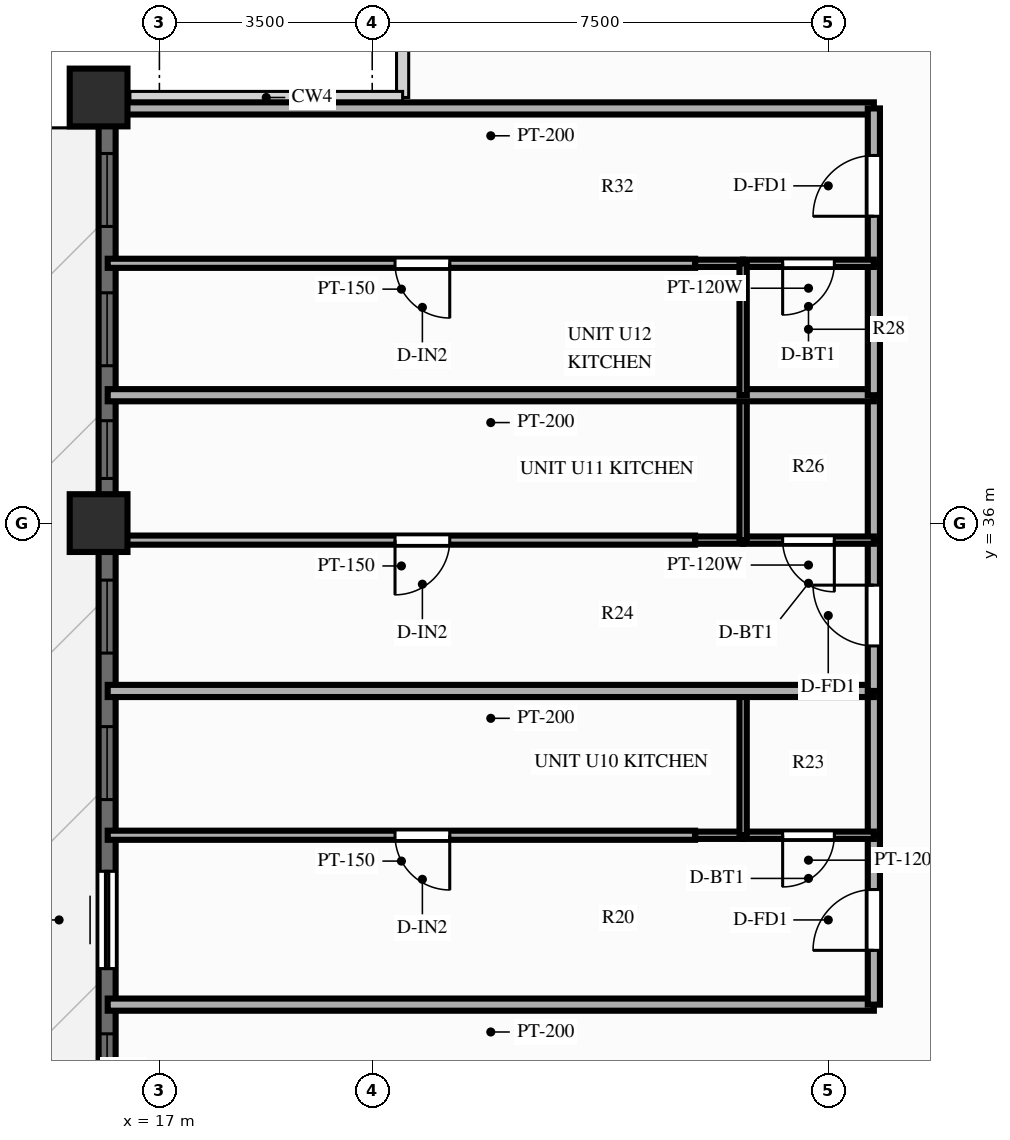
"""IFC4 building model, lengths in metres.
Left out: names, types, materials, properties, quantities, classifications, styles, units other than length and angle.
Written with IfcOpenShell. Run it as: python <this file> out.ifc"""

import sys

from ifc_helpers import new_model, si_unit, direction, frame, frame_2d, origin, origin_2d, place, context, subcontext, project, spatial, rectangle, extrude, source, transform, mapped, element, fill, save


model = new_model("IFC4")
c1 = context("Model", 3, precision=1e-05, world=origin(), true_north=direction((0.0, 1.0)))
c2 = subcontext(c1, "Body", "Model", "MODEL_VIEW")
j1 = project(units=[si_unit("LENGTHUNIT", "METRE"), si_unit("PLANEANGLEUNIT", "RADIAN")], contexts=[c1])
p1 = place(None, origin())
s1 = spatial("IfcSite", under=j1, at=p1, CompositionType="ELEMENT")
p2 = place(p1, origin())
s2 = spatial("IfcBuilding", under=s1, at=p2, CompositionType="ELEMENT")
p3 = place(p2, frame((0.0, 0.0, 166.0)))
s3 = spatial("IfcBuildingStorey", under=s2, at=p3, CompositionType="ELEMENT", Elevation=166.0)
m1 = source(origin(), c2, "Body", "SweptSolid", [
    extrude(rectangle(XDim=0.95, YDim=0.95, at=origin_2d()), origin(), (0.0, 0.0, 1.0), 3.0),
])
for number, where, z_axis, x_axis in (
    (1, (16.0, 43.0, 0.0), (0.0, 0.0, 1.0), (1.0, 0.0, 0.0)),
    (2, (16.0, 36.0, 0.0), (0.0, 0.0, 1.0), (1.0, 0.0, 0.0)),
):
    element("IfcColumn", number, at=place(p3, frame(where, z_axis=z_axis, x_axis=x_axis)), inside=s3, PredefinedType="COLUMN", context=c2, shape_type="MappedRepresentation", body=[
        mapped(m1, transform((0.0, 0.0, 0.0), scale=1.0)),
    ])
p4 = place(p3, frame((16.14, 11.0, 0.0), z_axis=(0.0, 0.0, 1.0), x_axis=(0.0, 1.0, 0.0)))
e3 = element("IfcWall", 3, at=p4, inside=s3, PredefinedType="SOLIDWALL", context=c2, shape_type="SweptSolid", body=[
    extrude(rectangle(XDim=32.0, YDim=0.28, at=frame_2d((16.0, 0.0))), origin(), (0.0, 0.0, 1.0), 2.28),
])
p5 = place(p4, frame((1.001, 0.0, 0.25)))
e4 = element("IfcOpeningElement", 4, at=p5, cuts=e3, PredefinedType="OPENING", context=c2, shape_type="SweptSolid", body=[
    extrude(rectangle(XDim=1.2, YDim=1.5, at=frame_2d((0.6, 0.75))), frame((0.0, 0.152, 0.0), z_axis=(0.0, -1.0, 0.0), x_axis=(1.0, 0.0, 0.0)), (0.0, 0.0, 1.0), 0.304),
])
p6 = place(p4, frame((3.439, 0.0, 0.25)))
e5 = element("IfcOpeningElement", 5, at=p6, cuts=e3, PredefinedType="OPENING", context=c2, shape_type="SweptSolid", body=[
    extrude(rectangle(XDim=1.2, YDim=1.5, at=frame_2d((0.6, 0.75))), frame((0.0, 0.152, 0.0), z_axis=(0.0, -1.0, 0.0), x_axis=(1.0, 0.0, 0.0)), (0.0, 0.0, 1.0), 0.304),
])
p7 = place(p4, frame((5.588, 0.0, 0.25)))
e6 = element("IfcOpeningElement", 6, at=p7, cuts=e3, PredefinedType="OPENING", context=c2, shape_type="SweptSolid", body=[
    extrude(rectangle(XDim=0.7, YDim=1.5, at=frame_2d((0.35, 0.75))), frame((0.0, 0.152, 0.0), z_axis=(0.0, -1.0, 0.0), x_axis=(1.0, 0.0, 0.0)), (0.0, 0.0, 1.0), 0.304),
])
p8 = place(p4, frame((8.085, 0.0, 0.25)))
e7 = element("IfcOpeningElement", 7, at=p8, cuts=e3, PredefinedType="OPENING", context=c2, shape_type="SweptSolid", body=[
    extrude(rectangle(XDim=1.2, YDim=1.5, at=frame_2d((0.6, 0.75))), frame((0.0, 0.152, 0.0), z_axis=(0.0, -1.0, 0.0), x_axis=(1.0, 0.0, 0.0)), (0.0, 0.0, 1.0), 0.304),
])
p9 = place(p4, frame((10.575, 0.0, 0.25)))
e8 = element("IfcOpeningElement", 8, at=p9, cuts=e3, PredefinedType="OPENING", context=c2, shape_type="SweptSolid", body=[
    extrude(rectangle(XDim=1.2, YDim=1.5, at=frame_2d((0.6, 0.75))), frame((0.0, 0.152, 0.0), z_axis=(0.0, -1.0, 0.0), x_axis=(1.0, 0.0, 0.0)), (0.0, 0.0, 1.0), 0.304),
])
p10 = place(p4, frame((13.007, 0.0, 0.25)))
e9 = element("IfcOpeningElement", 9, at=p10, cuts=e3, PredefinedType="OPENING", context=c2, shape_type="SweptSolid", body=[
    extrude(rectangle(XDim=1.2, YDim=1.5, at=frame_2d((0.6, 0.75))), frame((0.0, 0.152, 0.0), z_axis=(0.0, -1.0, 0.0), x_axis=(1.0, 0.0, 0.0)), (0.0, 0.0, 1.0), 0.304),
])
p11 = place(p4, frame((15.4, 0.0, 0.25)))
e10 = element("IfcOpeningElement", 10, at=p11, cuts=e3, PredefinedType="OPENING", context=c2, shape_type="SweptSolid", body=[
    extrude(rectangle(XDim=1.2, YDim=1.5, at=frame_2d((0.6, 0.75))), frame((0.0, 0.152, 0.0), z_axis=(0.0, -1.0, 0.0), x_axis=(1.0, 0.0, 0.0)), (0.0, 0.0, 1.0), 0.304),
])
p12 = place(p4, frame((17.673, 0.0, 0.0)))
e11 = element("IfcOpeningElement", 11, at=p12, cuts=e3, PredefinedType="OPENING", context=c2, shape_type="SweptSolid", body=[
    extrude(rectangle(XDim=1.6, YDim=2.15, at=frame_2d((0.8, 1.075))), frame((0.0, 0.152, 0.0), z_axis=(0.0, -1.0, 0.0), x_axis=(1.0, 0.0, 0.0)), (0.0, 0.0, 1.0), 0.304),
])
p13 = place(p4, frame((20.452, 0.0, 0.25)))
e12 = element("IfcOpeningElement", 12, at=p13, cuts=e3, PredefinedType="OPENING", context=c2, shape_type="SweptSolid", body=[
    extrude(rectangle(XDim=1.2, YDim=1.5, at=frame_2d((0.6, 0.75))), frame((0.0, 0.152, 0.0), z_axis=(0.0, -1.0, 0.0), x_axis=(1.0, 0.0, 0.0)), (0.0, 0.0, 1.0), 0.304),
])
p14 = place(p4, frame((22.862, 0.0, 0.25)))
e13 = element("IfcOpeningElement", 13, at=p14, cuts=e3, PredefinedType="OPENING", context=c2, shape_type="SweptSolid", body=[
    extrude(rectangle(XDim=1.2, YDim=1.5, at=frame_2d((0.6, 0.75))), frame((0.0, 0.152, 0.0), z_axis=(0.0, -1.0, 0.0), x_axis=(1.0, 0.0, 0.0)), (0.0, 0.0, 1.0), 0.304),
])
p15 = place(p4, frame((25.734, 0.0, 0.25)))
e14 = element("IfcOpeningElement", 14, at=p15, cuts=e3, PredefinedType="OPENING", context=c2, shape_type="SweptSolid", body=[
    extrude(rectangle(XDim=0.95, YDim=1.5, at=frame_2d((0.475, 0.75))), frame((0.0, 0.152, 0.0), z_axis=(0.0, -1.0, 0.0), x_axis=(1.0, 0.0, 0.0)), (0.0, 0.0, 1.0), 0.304),
])
p16 = place(p4, frame((27.588, 0.0, 0.25)))
e15 = element("IfcOpeningElement", 15, at=p16, cuts=e3, PredefinedType="OPENING", context=c2, shape_type="SweptSolid", body=[
    extrude(rectangle(XDim=1.2, YDim=1.5, at=frame_2d((0.6, 0.75))), frame((0.0, 0.152, 0.0), z_axis=(0.0, -1.0, 0.0), x_axis=(1.0, 0.0, 0.0)), (0.0, 0.0, 1.0), 0.304),
])
p17 = place(p4, frame((29.879, 0.0, 0.25)))
e16 = element("IfcOpeningElement", 16, at=p17, cuts=e3, PredefinedType="OPENING", context=c2, shape_type="SweptSolid", body=[
    extrude(rectangle(XDim=1.2, YDim=1.5, at=frame_2d((0.6, 0.75))), frame((0.0, 0.152, 0.0), z_axis=(0.0, -1.0, 0.0), x_axis=(1.0, 0.0, 0.0)), (0.0, 0.0, 1.0), 0.304),
])
for number, where, z_axis, x_axis in (
    (17, (28.75, 28.08, 0.0), (0.0, 0.0, 1.0), (-1.0, 0.0, 0.0)),
    (18, (28.75, 42.82, 0.0), (0.0, 0.0, 1.0), (-1.0, 0.0, 0.0)),
):
    element("IfcWall", number, at=place(p3, frame(where, z_axis=z_axis, x_axis=x_axis)), inside=s3, PredefinedType="PARTITIONING", context=c2, shape_type="SweptSolid", body=[
        extrude(rectangle(XDim=12.6, YDim=0.2, at=frame_2d((6.3, 0.0))), origin(), (0.0, 0.0, 1.0), 2.79),
    ])
p18 = place(p3, frame((28.75, 28.08, 0.0), z_axis=(0.0, 0.0, 1.0), x_axis=(0.0, 1.0, 0.0)))
e19 = element("IfcWall", 19, at=p18, inside=s3, PredefinedType="PARTITIONING", context=c2, shape_type="SweptSolid", body=[
    extrude(rectangle(XDim=2.786, YDim=0.2, at=frame_2d((1.393, 0.0))), origin(), (0.0, 0.0, 1.0), 2.79),
])
p19 = place(p18, frame((0.893, 0.0, 0.0)))
e20 = element("IfcOpeningElement", 20, at=p19, cuts=e19, PredefinedType="OPENING", context=c2, shape_type="SweptSolid", body=[
    extrude(rectangle(XDim=1.0, YDim=2.15, at=frame_2d((0.5, 1.075))), frame((0.0, 0.112, 0.0), z_axis=(0.0, -1.0, 0.0), x_axis=(1.0, 0.0, 0.0)), (0.0, 0.0, 1.0), 0.224),
])
p20 = place(p3, frame((28.75, 30.866, 0.0), z_axis=(0.0, 0.0, 1.0), x_axis=(0.0, 1.0, 0.0)))
e21 = element("IfcWall", 21, at=p20, inside=s3, PredefinedType="PARTITIONING", context=c2, shape_type="SweptSolid", body=[
    extrude(rectangle(XDim=2.373, YDim=0.2, at=frame_2d((1.187, 0.0))), origin(), (0.0, 0.0, 1.0), 2.79),
])
p21 = place(p3, frame((28.75, 30.866, 0.0), z_axis=(0.0, 0.0, 1.0), x_axis=(-1.0, 0.0, 0.0)))
e22 = element("IfcWall", 22, at=p21, inside=s3, PredefinedType="PARTITIONING", context=c2, shape_type="SweptSolid", body=[
    extrude(rectangle(XDim=2.15, YDim=0.12, at=frame_2d((1.075, 0.0))), origin(), (0.0, 0.0, 1.0), 2.79),
])
p22 = place(p21, frame((0.65, 0.0, 0.0)))
e23 = element("IfcOpeningElement", 23, at=p22, cuts=e22, PredefinedType="OPENING", context=c2, shape_type="SweptSolid", body=[
    extrude(rectangle(XDim=0.85, YDim=2.05, at=frame_2d((0.425, 1.025))), frame((0.0, 0.072, 0.0), z_axis=(0.0, -1.0, 0.0), x_axis=(1.0, 0.0, 0.0)), (0.0, 0.0, 1.0), 0.144),
])
p23 = place(p3, frame((26.6, 30.866, 0.0), z_axis=(0.0, 0.0, 1.0), x_axis=(-1.0, 0.0, 0.0)))
e24 = element("IfcWall", 24, at=p23, inside=s3, PredefinedType="PARTITIONING", context=c2, shape_type="SweptSolid", body=[
    extrude(rectangle(XDim=0.79, YDim=0.12, at=frame_2d((0.395, 0.0))), origin(), (0.0, 0.0, 1.0), 2.79),
])
p24 = place(p3, frame((26.6, 30.866, 0.0), z_axis=(0.0, 0.0, 1.0), x_axis=(0.0, 1.0, 0.0)))
e25 = element("IfcWall", 25, at=p24, inside=s3, PredefinedType="PARTITIONING", context=c2, shape_type="SweptSolid", body=[
    extrude(rectangle(XDim=2.373, YDim=0.12, at=frame_2d((1.187, 0.0))), origin(), (0.0, 0.0, 1.0), 2.79),
])
p25 = place(p3, frame((25.81, 30.866, 0.0), z_axis=(0.0, 0.0, 1.0), x_axis=(-1.0, 0.0, 0.0)))
e26 = element("IfcWall", 26, at=p25, inside=s3, PredefinedType="PARTITIONING", context=c2, shape_type="SweptSolid", body=[
    extrude(rectangle(XDim=9.66, YDim=0.15, at=frame_2d((4.83, 0.0))), origin(), (0.0, 0.0, 1.0), 2.79),
])
p26 = place(p25, frame((4.035, 0.0, 0.0)))
e27 = element("IfcOpeningElement", 27, at=p26, cuts=e26, PredefinedType="OPENING", context=c2, shape_type="SweptSolid", body=[
    extrude(rectangle(XDim=0.9, YDim=2.1, at=frame_2d((0.45, 1.05))), frame((0.0, 0.087, 0.0), z_axis=(0.0, -1.0, 0.0), x_axis=(1.0, 0.0, 0.0)), (0.0, 0.0, 1.0), 0.174),
])
p27 = place(p3, frame((28.75, 33.239, 0.0), z_axis=(0.0, 0.0, 1.0), x_axis=(-1.0, 0.0, 0.0)))
e28 = element("IfcWall", 28, at=p27, inside=s3, PredefinedType="PARTITIONING", context=c2, shape_type="SweptSolid", body=[
    extrude(rectangle(XDim=12.6, YDim=0.2, at=frame_2d((6.3, 0.0))), origin(), (0.0, 0.0, 1.0), 2.79),
])
p28 = place(p3, frame((28.75, 33.239, 0.0), z_axis=(0.0, 0.0, 1.0), x_axis=(0.0, 1.0, 0.0)))
e29 = element("IfcWall", 29, at=p28, inside=s3, PredefinedType="PARTITIONING", context=c2, shape_type="SweptSolid", body=[
    extrude(rectangle(XDim=2.481, YDim=0.2, at=frame_2d((1.24, 0.0))), origin(), (0.0, 0.0, 1.0), 2.79),
])
p29 = place(p28, frame((0.74, 0.0, 0.0)))
e30 = element("IfcOpeningElement", 30, at=p29, cuts=e29, PredefinedType="OPENING", context=c2, shape_type="SweptSolid", body=[
    extrude(rectangle(XDim=1.0, YDim=2.15, at=frame_2d((0.5, 1.075))), frame((0.0, 0.112, 0.0), z_axis=(0.0, -1.0, 0.0), x_axis=(1.0, 0.0, 0.0)), (0.0, 0.0, 1.0), 0.224),
])
p30 = place(p3, frame((28.75, 35.72, 0.0), z_axis=(0.0, 0.0, 1.0), x_axis=(0.0, 1.0, 0.0)))
e31 = element("IfcWall", 31, at=p30, inside=s3, PredefinedType="PARTITIONING", context=c2, shape_type="SweptSolid", body=[
    extrude(rectangle(XDim=2.383, YDim=0.2, at=frame_2d((1.192, 0.0))), origin(), (0.0, 0.0, 1.0), 2.79),
])
p31 = place(p3, frame((28.75, 35.72, 0.0), z_axis=(0.0, 0.0, 1.0), x_axis=(-1.0, 0.0, 0.0)))
e32 = element("IfcWall", 32, at=p31, inside=s3, PredefinedType="PARTITIONING", context=c2, shape_type="SweptSolid", body=[
    extrude(rectangle(XDim=2.15, YDim=0.12, at=frame_2d((1.075, 0.0))), origin(), (0.0, 0.0, 1.0), 2.79),
])
p32 = place(p31, frame((0.65, 0.0, 0.0)))
e33 = element("IfcOpeningElement", 33, at=p32, cuts=e32, PredefinedType="OPENING", context=c2, shape_type="SweptSolid", body=[
    extrude(rectangle(XDim=0.85, YDim=2.05, at=frame_2d((0.425, 1.025))), frame((0.0, 0.072, 0.0), z_axis=(0.0, -1.0, 0.0), x_axis=(1.0, 0.0, 0.0)), (0.0, 0.0, 1.0), 0.144),
])
p33 = place(p3, frame((26.6, 35.72, 0.0), z_axis=(0.0, 0.0, 1.0), x_axis=(-1.0, 0.0, 0.0)))
e34 = element("IfcWall", 34, at=p33, inside=s3, PredefinedType="PARTITIONING", context=c2, shape_type="SweptSolid", body=[
    extrude(rectangle(XDim=0.79, YDim=0.12, at=frame_2d((0.395, 0.0))), origin(), (0.0, 0.0, 1.0), 2.79),
])
p34 = place(p3, frame((26.6, 35.72, 0.0), z_axis=(0.0, 0.0, 1.0), x_axis=(0.0, 1.0, 0.0)))
e35 = element("IfcWall", 35, at=p34, inside=s3, PredefinedType="PARTITIONING", context=c2, shape_type="SweptSolid", body=[
    extrude(rectangle(XDim=2.383, YDim=0.12, at=frame_2d((1.192, 0.0))), origin(), (0.0, 0.0, 1.0), 2.79),
])
p35 = place(p3, frame((25.81, 35.72, 0.0), z_axis=(0.0, 0.0, 1.0), x_axis=(-1.0, 0.0, 0.0)))
e36 = element("IfcWall", 36, at=p35, inside=s3, PredefinedType="PARTITIONING", context=c2, shape_type="SweptSolid", body=[
    extrude(rectangle(XDim=9.66, YDim=0.15, at=frame_2d((4.83, 0.0))), origin(), (0.0, 0.0, 1.0), 2.79),
])
p36 = place(p35, frame((4.035, 0.0, 0.0)))
e37 = element("IfcOpeningElement", 37, at=p36, cuts=e36, PredefinedType="OPENING", context=c2, shape_type="SweptSolid", body=[
    extrude(rectangle(XDim=0.9, YDim=2.1, at=frame_2d((0.45, 1.05))), frame((0.0, 0.087, 0.0), z_axis=(0.0, -1.0, 0.0), x_axis=(1.0, 0.0, 0.0)), (0.0, 0.0, 1.0), 0.174),
])
p37 = place(p3, frame((28.75, 38.103, 0.0), z_axis=(0.0, 0.0, 1.0), x_axis=(-1.0, 0.0, 0.0)))
e38 = element("IfcWall", 38, at=p37, inside=s3, PredefinedType="PARTITIONING", context=c2, shape_type="SweptSolid", body=[
    extrude(rectangle(XDim=12.6, YDim=0.2, at=frame_2d((6.3, 0.0))), origin(), (0.0, 0.0, 1.0), 2.79),
])
p38 = place(p3, frame((28.75, 38.103, 0.0), z_axis=(0.0, 0.0, 1.0), x_axis=(0.0, 1.0, 0.0)))
e39 = element("IfcWall", 39, at=p38, inside=s3, PredefinedType="PARTITIONING", context=c2, shape_type="SweptSolid", body=[
    extrude(rectangle(XDim=2.17, YDim=0.2, at=frame_2d((1.085, 0.0))), origin(), (0.0, 0.0, 1.0), 2.79),
])
p39 = place(p3, frame((28.75, 40.273, 0.0), z_axis=(0.0, 0.0, 1.0), x_axis=(0.0, 1.0, 0.0)))
e40 = element("IfcWall", 40, at=p39, inside=s3, PredefinedType="PARTITIONING", context=c2, shape_type="SweptSolid", body=[
    extrude(rectangle(XDim=2.547, YDim=0.2, at=frame_2d((1.273, 0.0))), origin(), (0.0, 0.0, 1.0), 2.79),
])
p40 = place(p39, frame((0.774, 0.0, 0.0)))
e41 = element("IfcOpeningElement", 41, at=p40, cuts=e40, PredefinedType="OPENING", context=c2, shape_type="SweptSolid", body=[
    extrude(rectangle(XDim=1.0, YDim=2.15, at=frame_2d((0.5, 1.075))), frame((0.0, 0.112, 0.0), z_axis=(0.0, -1.0, 0.0), x_axis=(1.0, 0.0, 0.0)), (0.0, 0.0, 1.0), 0.224),
])
p41 = place(p3, frame((28.75, 40.273, 0.0), z_axis=(0.0, 0.0, 1.0), x_axis=(-1.0, 0.0, 0.0)))
e42 = element("IfcWall", 42, at=p41, inside=s3, PredefinedType="PARTITIONING", context=c2, shape_type="SweptSolid", body=[
    extrude(rectangle(XDim=2.15, YDim=0.12, at=frame_2d((1.075, 0.0))), origin(), (0.0, 0.0, 1.0), 2.79),
])
p42 = place(p41, frame((0.65, 0.0, 0.0)))
e43 = element("IfcOpeningElement", 43, at=p42, cuts=e42, PredefinedType="OPENING", context=c2, shape_type="SweptSolid", body=[
    extrude(rectangle(XDim=0.85, YDim=2.05, at=frame_2d((0.425, 1.025))), frame((0.0, 0.072, 0.0), z_axis=(0.0, -1.0, 0.0), x_axis=(1.0, 0.0, 0.0)), (0.0, 0.0, 1.0), 0.144),
])
p43 = place(p3, frame((26.6, 40.273, 0.0), z_axis=(0.0, 0.0, 1.0), x_axis=(-1.0, 0.0, 0.0)))
e44 = element("IfcWall", 44, at=p43, inside=s3, PredefinedType="PARTITIONING", context=c2, shape_type="SweptSolid", body=[
    extrude(rectangle(XDim=0.79, YDim=0.12, at=frame_2d((0.395, 0.0))), origin(), (0.0, 0.0, 1.0), 2.79),
])
p44 = place(p3, frame((26.6, 38.103, 0.0), z_axis=(0.0, 0.0, 1.0), x_axis=(0.0, 1.0, 0.0)))
e45 = element("IfcWall", 45, at=p44, inside=s3, PredefinedType="PARTITIONING", context=c2, shape_type="SweptSolid", body=[
    extrude(rectangle(XDim=2.17, YDim=0.12, at=frame_2d((1.085, 0.0))), origin(), (0.0, 0.0, 1.0), 2.79),
])
p45 = place(p3, frame((25.81, 40.273, 0.0), z_axis=(0.0, 0.0, 1.0), x_axis=(-1.0, 0.0, 0.0)))
e46 = element("IfcWall", 46, at=p45, inside=s3, PredefinedType="PARTITIONING", context=c2, shape_type="SweptSolid", body=[
    extrude(rectangle(XDim=9.66, YDim=0.15, at=frame_2d((4.83, 0.0))), origin(), (0.0, 0.0, 1.0), 2.79),
])
p46 = place(p45, frame((4.035, 0.0, 0.0)))
e47 = element("IfcOpeningElement", 47, at=p46, cuts=e46, PredefinedType="OPENING", context=c2, shape_type="SweptSolid", body=[
    extrude(rectangle(XDim=0.9, YDim=2.1, at=frame_2d((0.45, 1.05))), frame((0.0, 0.087, 0.0), z_axis=(0.0, -1.0, 0.0), x_axis=(1.0, 0.0, 0.0)), (0.0, 0.0, 1.0), 0.174),
])
m2 = source(origin(), c2, "Body", "SweptSolid", [
    extrude(rectangle(XDim=1.2, YDim=1.5, at=frame_2d((0.6, 0.75))), frame((0.0, 0.03, 0.0), z_axis=(0.0, -1.0, 0.0), x_axis=(1.0, 0.0, 0.0)), (0.0, 0.0, 1.0), 0.06),
])
p47 = place(p11, origin())
e48 = element("IfcWindow", 48, at=p47, inside=s3, PartitioningType="SINGLE_PANEL", PredefinedType="WINDOW", context=c2, shape_type="MappedRepresentation", body=[
    mapped(m2, transform((0.0, 0.0, 0.0), scale=1.0)),
])
fill(e10, e48)
m3 = source(origin(), c2, "Body", "SweptSolid", [
    extrude(rectangle(XDim=1.6, YDim=2.15, at=frame_2d((0.8, 1.075))), frame((0.0, 0.025, 0.0), z_axis=(0.0, -1.0, 0.0), x_axis=(1.0, 0.0, 0.0)), (0.0, 0.0, 1.0), 0.05),
])
p48 = place(p12, origin())
e49 = element("IfcDoor", 49, at=p48, inside=s3, OperationType="SLIDING_TO_LEFT", PredefinedType="DOOR", context=c2, shape_type="MappedRepresentation", body=[
    mapped(m3, transform((0.0, 0.0, 0.0), scale=1.0)),
])
fill(e11, e49)
p49 = place(p13, origin())
e50 = element("IfcWindow", 50, at=p49, inside=s3, PartitioningType="SINGLE_PANEL", PredefinedType="WINDOW", context=c2, shape_type="MappedRepresentation", body=[
    mapped(m2, transform((0.0, 0.0, 0.0), scale=1.0)),
])
fill(e12, e50)
p50 = place(p14, origin())
e51 = element("IfcWindow", 51, at=p50, inside=s3, PartitioningType="SINGLE_PANEL", PredefinedType="WINDOW", context=c2, shape_type="MappedRepresentation", body=[
    mapped(m2, transform((0.0, 0.0, 0.0), scale=1.0)),
])
fill(e13, e51)
m4 = source(origin(), c2, "Body", "SweptSolid", [
    extrude(rectangle(XDim=0.95, YDim=1.5, at=frame_2d((0.475, 0.75))), frame((0.0, 0.03, 0.0), z_axis=(0.0, -1.0, 0.0), x_axis=(1.0, 0.0, 0.0)), (0.0, 0.0, 1.0), 0.06),
])
p51 = place(p15, origin())
e52 = element("IfcWindow", 52, at=p51, inside=s3, PartitioningType="SINGLE_PANEL", PredefinedType="WINDOW", context=c2, shape_type="MappedRepresentation", body=[
    mapped(m4, transform((0.0, 0.0, 0.0), scale=1.0)),
])
fill(e14, e52)
p52 = place(p16, origin())
e53 = element("IfcWindow", 53, at=p52, inside=s3, PartitioningType="SINGLE_PANEL", PredefinedType="WINDOW", context=c2, shape_type="MappedRepresentation", body=[
    mapped(m2, transform((0.0, 0.0, 0.0), scale=1.0)),
])
fill(e15, e53)
p53 = place(p17, origin())
e54 = element("IfcWindow", 54, at=p53, inside=s3, PartitioningType="SINGLE_PANEL", PredefinedType="WINDOW", context=c2, shape_type="MappedRepresentation", body=[
    mapped(m2, transform((0.0, 0.0, 0.0), scale=1.0)),
])
fill(e16, e54)
m5 = source(origin(), c2, "Body", "SweptSolid", [
    extrude(rectangle(XDim=1.0, YDim=2.15, at=frame_2d((0.5, 1.075))), frame((0.0, 0.025, 0.0), z_axis=(0.0, -1.0, 0.0), x_axis=(1.0, 0.0, 0.0)), (0.0, 0.0, 1.0), 0.05),
])
p54 = place(p19, origin())
e55 = element("IfcDoor", 55, at=p54, inside=s3, OperationType="SINGLE_SWING_LEFT", PredefinedType="DOOR", context=c2, shape_type="MappedRepresentation", body=[
    mapped(m5, transform((0.0, 0.0, 0.0), scale=1.0)),
])
fill(e20, e55)
m6 = source(origin(), c2, "Body", "SweptSolid", [
    extrude(rectangle(XDim=0.85, YDim=2.05, at=frame_2d((0.425, 1.025))), frame((0.0, 0.025, 0.0), z_axis=(0.0, -1.0, 0.0), x_axis=(1.0, 0.0, 0.0)), (0.0, 0.0, 1.0), 0.05),
])
p55 = place(p22, origin())
e56 = element("IfcDoor", 56, at=p55, inside=s3, OperationType="SINGLE_SWING_RIGHT", PredefinedType="DOOR", context=c2, shape_type="MappedRepresentation", body=[
    mapped(m6, transform((0.0, 0.0, 0.0), scale=1.0)),
])
fill(e23, e56)
m7 = source(origin(), c2, "Body", "SweptSolid", [
    extrude(rectangle(XDim=0.9, YDim=2.1, at=frame_2d((0.45, 1.05))), frame((0.0, 0.025, 0.0), z_axis=(0.0, -1.0, 0.0), x_axis=(1.0, 0.0, 0.0)), (0.0, 0.0, 1.0), 0.05),
])
p56 = place(p26, origin())
e57 = element("IfcDoor", 57, at=p56, inside=s3, OperationType="SINGLE_SWING_LEFT", PredefinedType="DOOR", context=c2, shape_type="MappedRepresentation", body=[
    mapped(m7, transform((0.0, 0.0, 0.0), scale=1.0)),
])
fill(e27, e57)
p57 = place(p29, origin())
e58 = element("IfcDoor", 58, at=p57, inside=s3, OperationType="SINGLE_SWING_RIGHT", PredefinedType="DOOR", context=c2, shape_type="MappedRepresentation", body=[
    mapped(m5, transform((0.0, 0.0, 0.0), scale=1.0)),
])
fill(e30, e58)
p58 = place(p32, origin())
e59 = element("IfcDoor", 59, at=p58, inside=s3, OperationType="SINGLE_SWING_LEFT", PredefinedType="DOOR", context=c2, shape_type="MappedRepresentation", body=[
    mapped(m6, transform((0.0, 0.0, 0.0), scale=1.0)),
])
fill(e33, e59)
p59 = place(p36, origin())
e60 = element("IfcDoor", 60, at=p59, inside=s3, OperationType="SINGLE_SWING_RIGHT", PredefinedType="DOOR", context=c2, shape_type="MappedRepresentation", body=[
    mapped(m7, transform((0.0, 0.0, 0.0), scale=1.0)),
])
fill(e37, e60)
p60 = place(p40, origin())
e61 = element("IfcDoor", 61, at=p60, inside=s3, OperationType="SINGLE_SWING_LEFT", PredefinedType="DOOR", context=c2, shape_type="MappedRepresentation", body=[
    mapped(m5, transform((0.0, 0.0, 0.0), scale=1.0)),
])
fill(e41, e61)
p61 = place(p42, origin())
e62 = element("IfcDoor", 62, at=p61, inside=s3, OperationType="SINGLE_SWING_RIGHT", PredefinedType="DOOR", context=c2, shape_type="MappedRepresentation", body=[
    mapped(m6, transform((0.0, 0.0, 0.0), scale=1.0)),
])
fill(e43, e62)
p62 = place(p46, origin())
e63 = element("IfcDoor", 63, at=p62, inside=s3, OperationType="SINGLE_SWING_LEFT", PredefinedType="DOOR", context=c2, shape_type="MappedRepresentation", body=[
    mapped(m7, transform((0.0, 0.0, 0.0), scale=1.0)),
])
fill(e47, e63)
save(model, sys.argv[1])
